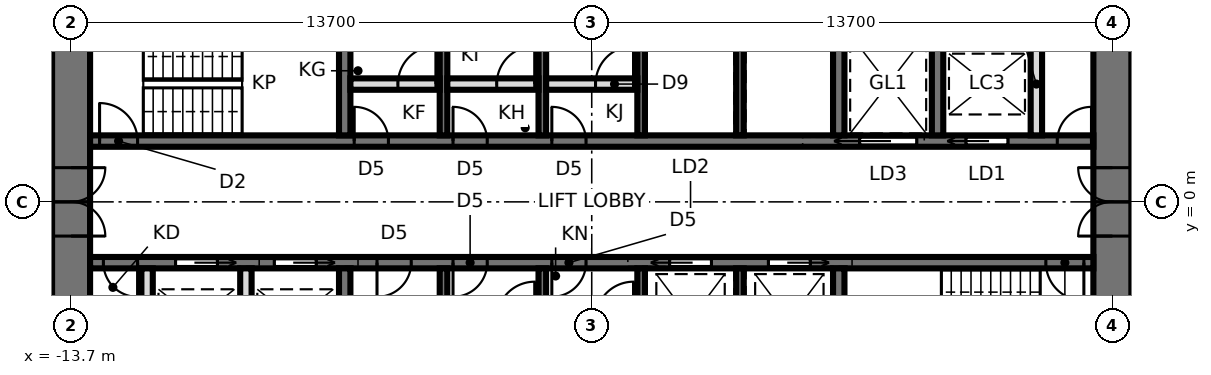
"""IFC4 building model, lengths in metres.
Left out: names, types, materials, properties, quantities, classifications, styles, units other than length and angle.
Written with IfcOpenShell. Run it as: python <this file> out.ifc"""

import sys

from ifc_helpers import new_model, si_unit, direction, frame, frame_2d, origin, place, context, subcontext, project, spatial, rectangle, extrude, element, fill, save


model = new_model("IFC4")
c1 = context("Model", 3, precision=1e-05, world=origin(), true_north=direction((0.0, 1.0)))
c2 = subcontext(c1, "Body", "Model", "MODEL_VIEW")
j1 = project(units=[si_unit("LENGTHUNIT", "METRE"), si_unit("PLANEANGLEUNIT", "RADIAN")], contexts=[c1])
p1 = place(None, origin())
s1 = spatial("IfcSite", under=j1, at=p1, CompositionType="ELEMENT")
p2 = place(p1, origin())
s2 = spatial("IfcBuilding", under=s1, at=p2, CompositionType="ELEMENT")
p3 = place(p2, frame((0.0, 0.0, 187.7)))
s3 = spatial("IfcBuildingStorey", under=s2, at=p3, CompositionType="ELEMENT", Elevation=187.7)
p4 = place(p3, frame((13.7, -9.5, 0.0), z_axis=(0.0, 0.0, 1.0), x_axis=(0.0, 1.0, 0.0)))
e1 = element("IfcWall", 1, at=p4, inside=s3, PredefinedType="SHEAR", context=c2, shape_type="SweptSolid", body=[
    extrude(rectangle(XDim=19.0, YDim=1.0, at=frame_2d((9.5, 0.0))), origin(), (0.0, 0.0, 1.0), 3.9),
])
p5 = place(p4, frame((8.6, 0.0, 0.0)))
e2 = element("IfcOpeningElement", 2, at=p5, cuts=e1, PredefinedType="OPENING", context=c2, shape_type="SweptSolid", body=[
    extrude(rectangle(XDim=1.8, YDim=2.4, at=frame_2d((0.9, 1.2))), frame((0.0, 0.51, 0.0), z_axis=(0.0, -1.0, 0.0), x_axis=(1.0, 0.0, 0.0)), (0.0, 0.0, 1.0), 1.02),
])
p6 = place(p3, frame((-13.7, 9.5, 0.0), z_axis=(0.0, 0.0, 1.0), x_axis=(0.0, -1.0, 0.0)))
e3 = element("IfcWall", 3, at=p6, inside=s3, PredefinedType="SHEAR", context=c2, shape_type="SweptSolid", body=[
    extrude(rectangle(XDim=19.0, YDim=1.0, at=frame_2d((9.5, 0.0))), origin(), (0.0, 0.0, 1.0), 3.9),
])
p7 = place(p6, frame((8.6, 0.0, 0.0)))
e4 = element("IfcOpeningElement", 4, at=p7, cuts=e3, PredefinedType="OPENING", context=c2, shape_type="SweptSolid", body=[
    extrude(rectangle(XDim=1.8, YDim=2.4, at=frame_2d((0.9, 1.2))), frame((0.0, 0.51, 0.0), z_axis=(0.0, -1.0, 0.0), x_axis=(1.0, 0.0, 0.0)), (0.0, 0.0, 1.0), 1.02),
])
p8 = place(p3, frame((-13.2, 1.6, 0.0), z_axis=(0.0, 0.0, 1.0), x_axis=(1.0, 0.0, 0.0)))
e5 = element("IfcWall", 5, at=p8, inside=s3, PredefinedType="SHEAR", context=c2, shape_type="SweptSolid", body=[
    extrude(rectangle(XDim=26.4, YDim=0.3, at=frame_2d((13.2, 0.0))), origin(), (0.0, 0.0, 1.0), 3.9),
])
p9 = place(p8, frame((0.25, 0.0, 0.0)))
e6 = element("IfcOpeningElement", 6, at=p9, cuts=e5, PredefinedType="OPENING", context=c2, shape_type="SweptSolid", body=[
    extrude(rectangle(XDim=1.0, YDim=2.1, at=frame_2d((0.5, 1.05))), frame((0.0, 0.16, 0.0), z_axis=(0.0, -1.0, 0.0), x_axis=(1.0, 0.0, 0.0)), (0.0, 0.0, 1.0), 0.32),
])
p10 = place(p8, frame((23.05, 0.0, 0.0)))
e7 = element("IfcOpeningElement", 7, at=p10, cuts=e5, PredefinedType="OPENING", context=c2, shape_type="SweptSolid", body=[
    extrude(rectangle(XDim=1.1, YDim=2.3, at=frame_2d((0.55, 1.15))), frame((0.0, 0.16, 0.0), z_axis=(0.0, -1.0, 0.0), x_axis=(1.0, 0.0, 0.0)), (0.0, 0.0, 1.0), 0.32),
])
p11 = place(p8, frame((20.25, 0.0, 0.0)))
e8 = element("IfcOpeningElement", 8, at=p11, cuts=e5, PredefinedType="OPENING", context=c2, shape_type="SweptSolid", body=[
    extrude(rectangle(XDim=1.5, YDim=2.4, at=frame_2d((0.75, 1.2))), frame((0.0, 0.16, 0.0), z_axis=(0.0, -1.0, 0.0), x_axis=(1.0, 0.0, 0.0)), (0.0, 0.0, 1.0), 0.32),
])
p12 = place(p8, frame((6.95, 0.0, 0.0)))
e9 = element("IfcOpeningElement", 9, at=p12, cuts=e5, PredefinedType="OPENING", context=c2, shape_type="SweptSolid", body=[
    extrude(rectangle(XDim=0.9, YDim=2.1, at=frame_2d((0.45, 1.05))), frame((0.0, 0.16, 0.0), z_axis=(0.0, -1.0, 0.0), x_axis=(1.0, 0.0, 0.0)), (0.0, 0.0, 1.0), 0.32),
])
p13 = place(p8, frame((9.55, 0.0, 0.0)))
e10 = element("IfcOpeningElement", 10, at=p13, cuts=e5, PredefinedType="OPENING", context=c2, shape_type="SweptSolid", body=[
    extrude(rectangle(XDim=0.9, YDim=2.1, at=frame_2d((0.45, 1.05))), frame((0.0, 0.16, 0.0), z_axis=(0.0, -1.0, 0.0), x_axis=(1.0, 0.0, 0.0)), (0.0, 0.0, 1.0), 0.32),
])
p14 = place(p8, frame((12.15, 0.0, 0.0)))
e11 = element("IfcOpeningElement", 11, at=p14, cuts=e5, PredefinedType="OPENING", context=c2, shape_type="SweptSolid", body=[
    extrude(rectangle(XDim=0.9, YDim=2.1, at=frame_2d((0.45, 1.05))), frame((0.0, 0.16, 0.0), z_axis=(0.0, -1.0, 0.0), x_axis=(1.0, 0.0, 0.0)), (0.0, 0.0, 1.0), 0.32),
])
p15 = place(p8, frame((25.45, 0.0, 0.0)))
e12 = element("IfcOpeningElement", 12, at=p15, cuts=e5, PredefinedType="OPENING", context=c2, shape_type="SweptSolid", body=[
    extrude(rectangle(XDim=0.9, YDim=2.1, at=frame_2d((0.45, 1.05))), frame((0.0, 0.16, 0.0), z_axis=(0.0, -1.0, 0.0), x_axis=(1.0, 0.0, 0.0)), (0.0, 0.0, 1.0), 0.32),
])
p16 = place(p3, frame((-13.2, -1.6, 0.0), z_axis=(0.0, 0.0, 1.0), x_axis=(1.0, 0.0, 0.0)))
e13 = element("IfcWall", 13, at=p16, inside=s3, PredefinedType="SHEAR", context=c2, shape_type="SweptSolid", body=[
    extrude(rectangle(XDim=26.4, YDim=0.3, at=frame_2d((13.2, 0.0))), origin(), (0.0, 0.0, 1.0), 3.9),
])
p17 = place(p16, frame((25.15, 0.0, 0.0)))
e14 = element("IfcOpeningElement", 14, at=p17, cuts=e13, PredefinedType="OPENING", context=c2, shape_type="SweptSolid", body=[
    extrude(rectangle(XDim=1.0, YDim=2.1, at=frame_2d((0.5, 1.05))), frame((0.0, 0.16, 0.0), z_axis=(0.0, -1.0, 0.0), x_axis=(1.0, 0.0, 0.0)), (0.0, 0.0, 1.0), 0.32),
])
p18 = place(p16, frame((7.55, 0.0, 0.0)))
e15 = element("IfcOpeningElement", 15, at=p18, cuts=e13, PredefinedType="OPENING", context=c2, shape_type="SweptSolid", body=[
    extrude(rectangle(XDim=0.9, YDim=2.1, at=frame_2d((0.45, 1.05))), frame((0.0, 0.16, 0.0), z_axis=(0.0, -1.0, 0.0), x_axis=(1.0, 0.0, 0.0)), (0.0, 0.0, 1.0), 0.32),
])
p19 = place(p16, frame((9.55, 0.0, 0.0)))
e16 = element("IfcOpeningElement", 16, at=p19, cuts=e13, PredefinedType="OPENING", context=c2, shape_type="SweptSolid", body=[
    extrude(rectangle(XDim=0.9, YDim=2.1, at=frame_2d((0.45, 1.05))), frame((0.0, 0.16, 0.0), z_axis=(0.0, -1.0, 0.0), x_axis=(1.0, 0.0, 0.0)), (0.0, 0.0, 1.0), 0.32),
])
p20 = place(p16, frame((12.15, 0.0, 0.0)))
e17 = element("IfcOpeningElement", 17, at=p20, cuts=e13, PredefinedType="OPENING", context=c2, shape_type="SweptSolid", body=[
    extrude(rectangle(XDim=0.9, YDim=2.1, at=frame_2d((0.45, 1.05))), frame((0.0, 0.16, 0.0), z_axis=(0.0, -1.0, 0.0), x_axis=(1.0, 0.0, 0.0)), (0.0, 0.0, 1.0), 0.32),
])
p21 = place(p16, frame((15.25, 0.0, 0.0)))
e18 = element("IfcOpeningElement", 18, at=p21, cuts=e13, PredefinedType="OPENING", context=c2, shape_type="SweptSolid", body=[
    extrude(rectangle(XDim=1.1, YDim=2.3, at=frame_2d((0.55, 1.15))), frame((0.0, 0.16, 0.0), z_axis=(0.0, -1.0, 0.0), x_axis=(1.0, 0.0, 0.0)), (0.0, 0.0, 1.0), 0.32),
])
p22 = place(p16, frame((17.85, 0.0, 0.0)))
e19 = element("IfcOpeningElement", 19, at=p22, cuts=e13, PredefinedType="OPENING", context=c2, shape_type="SweptSolid", body=[
    extrude(rectangle(XDim=1.1, YDim=2.3, at=frame_2d((0.55, 1.15))), frame((0.0, 0.16, 0.0), z_axis=(0.0, -1.0, 0.0), x_axis=(1.0, 0.0, 0.0)), (0.0, 0.0, 1.0), 0.32),
])
p23 = place(p16, frame((4.85, 0.0, 0.0)))
e20 = element("IfcOpeningElement", 20, at=p23, cuts=e13, PredefinedType="OPENING", context=c2, shape_type="SweptSolid", body=[
    extrude(rectangle(XDim=1.1, YDim=2.3, at=frame_2d((0.55, 1.15))), frame((0.0, 0.16, 0.0), z_axis=(0.0, -1.0, 0.0), x_axis=(1.0, 0.0, 0.0)), (0.0, 0.0, 1.0), 0.32),
])
p24 = place(p16, frame((2.25, 0.0, 0.0)))
e21 = element("IfcOpeningElement", 21, at=p24, cuts=e13, PredefinedType="OPENING", context=c2, shape_type="SweptSolid", body=[
    extrude(rectangle(XDim=1.1, YDim=2.3, at=frame_2d((0.55, 1.15))), frame((0.0, 0.16, 0.0), z_axis=(0.0, -1.0, 0.0), x_axis=(1.0, 0.0, 0.0)), (0.0, 0.0, 1.0), 0.32),
])
p25 = place(p16, frame((0.35, 0.0, 0.0)))
e22 = element("IfcOpeningElement", 22, at=p25, cuts=e13, PredefinedType="OPENING", context=c2, shape_type="SweptSolid", body=[
    extrude(rectangle(XDim=0.9, YDim=2.1, at=frame_2d((0.45, 1.05))), frame((0.0, 0.16, 0.0), z_axis=(0.0, -1.0, 0.0), x_axis=(1.0, 0.0, 0.0)), (0.0, 0.0, 1.0), 0.32),
])
for number, where, z_axis, x_axis in (
    (23, (-6.5, 1.75, 0.0), (0.0, 0.0, 1.0), (0.0, 1.0, 0.0)),
    (24, (6.5, 1.75, 0.0), (0.0, 0.0, 1.0), (0.0, 1.0, 0.0)),
):
    element("IfcWall", number, at=place(p3, frame(where, z_axis=z_axis, x_axis=x_axis)), inside=s3, PredefinedType="SHEAR", context=c2, shape_type="SweptSolid", body=[
        extrude(rectangle(XDim=2.7, YDim=0.3, at=frame_2d((1.35, 0.0))), origin(), (0.0, 0.0, 1.0), 3.9),
    ])
for number, where, z_axis, x_axis in (
    (25, (-3.9, 1.75, 0.0), (0.0, 0.0, 1.0), (0.0, 1.0, 0.0)),
    (26, (-1.3, 1.75, 0.0), (0.0, 0.0, 1.0), (0.0, 1.0, 0.0)),
    (27, (1.3, 1.75, 0.0), (0.0, 0.0, 1.0), (0.0, 1.0, 0.0)),
    (28, (3.9, 1.75, 0.0), (0.0, 0.0, 1.0), (0.0, 1.0, 0.0)),
):
    element("IfcWall", number, at=place(p3, frame(where, z_axis=z_axis, x_axis=x_axis)), inside=s3, PredefinedType="SHEAR", context=c2, shape_type="SweptSolid", body=[
        extrude(rectangle(XDim=2.7, YDim=0.2, at=frame_2d((1.35, 0.0))), origin(), (0.0, 0.0, 1.0), 3.9),
    ])
for number, where, z_axis, x_axis in (
    (29, (-6.5, -1.75, 0.0), (0.0, 0.0, 1.0), (0.0, -1.0, 0.0)),
    (30, (6.5, -1.75, 0.0), (0.0, 0.0, 1.0), (0.0, -1.0, 0.0)),
):
    element("IfcWall", number, at=place(p3, frame(where, z_axis=z_axis, x_axis=x_axis)), inside=s3, PredefinedType="SHEAR", context=c2, shape_type="SweptSolid", body=[
        extrude(rectangle(XDim=2.7, YDim=0.3, at=frame_2d((1.35, 0.0))), origin(), (0.0, 0.0, 1.0), 3.9),
    ])
for number, where, z_axis, x_axis in (
    (31, (-3.9, -1.75, 0.0), (0.0, 0.0, 1.0), (0.0, -1.0, 0.0)),
    (32, (-1.3, -1.75, 0.0), (0.0, 0.0, 1.0), (0.0, -1.0, 0.0)),
    (33, (1.3, -1.75, 0.0), (0.0, 0.0, 1.0), (0.0, -1.0, 0.0)),
    (34, (3.9, -1.75, 0.0), (0.0, 0.0, 1.0), (0.0, -1.0, 0.0)),
):
    element("IfcWall", number, at=place(p3, frame(where, z_axis=z_axis, x_axis=x_axis)), inside=s3, PredefinedType="SHEAR", context=c2, shape_type="SweptSolid", body=[
        extrude(rectangle(XDim=2.7, YDim=0.2, at=frame_2d((1.35, 0.0))), origin(), (0.0, 0.0, 1.0), 3.9),
    ])
p26 = place(p3, frame((9.1, 1.75, 0.0), z_axis=(0.0, 0.0, 1.0), x_axis=(0.0, 1.0, 0.0)))
e35 = element("IfcWall", 35, at=p26, inside=s3, PredefinedType="SHEAR", context=c2, shape_type="SweptSolid", body=[
    extrude(rectangle(XDim=2.7, YDim=0.3, at=frame_2d((1.35, 0.0))), origin(), (0.0, 0.0, 1.0), 3.9),
])
p27 = place(p3, frame((-6.35, 3.1, 0.0), z_axis=(0.0, 0.0, 1.0), x_axis=(1.0, 0.0, 0.0)))
e36 = element("IfcWall", 36, at=p27, inside=s3, PredefinedType="PARTITIONING", context=c2, shape_type="SweptSolid", body=[
    extrude(rectangle(XDim=2.35, YDim=0.3, at=frame_2d((1.175, 0.0))), origin(), (0.0, 0.0, 1.0), 3.74),
])
p28 = place(p27, frame((1.25, 0.0, 0.0)))
e37 = element("IfcOpeningElement", 37, at=p28, cuts=e36, PredefinedType="OPENING", context=c2, shape_type="SweptSolid", body=[
    extrude(rectangle(XDim=1.0, YDim=2.4, at=frame_2d((0.5, 1.2))), frame((0.0, 0.16, 0.0), z_axis=(0.0, -1.0, 0.0), x_axis=(1.0, 0.0, 0.0)), (0.0, 0.0, 1.0), 0.32),
])
p29 = place(p3, frame((-3.8, 3.1, 0.0), z_axis=(0.0, 0.0, 1.0), x_axis=(1.0, 0.0, 0.0)))
e38 = element("IfcWall", 38, at=p29, inside=s3, PredefinedType="PARTITIONING", context=c2, shape_type="SweptSolid", body=[
    extrude(rectangle(XDim=2.4, YDim=0.3, at=frame_2d((1.2, 0.0))), origin(), (0.0, 0.0, 1.0), 3.74),
])
p30 = place(p29, frame((1.3, 0.0, 0.0)))
e39 = element("IfcOpeningElement", 39, at=p30, cuts=e38, PredefinedType="OPENING", context=c2, shape_type="SweptSolid", body=[
    extrude(rectangle(XDim=1.0, YDim=2.4, at=frame_2d((0.5, 1.2))), frame((0.0, 0.16, 0.0), z_axis=(0.0, -1.0, 0.0), x_axis=(1.0, 0.0, 0.0)), (0.0, 0.0, 1.0), 0.32),
])
p31 = place(p3, frame((-1.2, 3.1, 0.0), z_axis=(0.0, 0.0, 1.0), x_axis=(1.0, 0.0, 0.0)))
e40 = element("IfcWall", 40, at=p31, inside=s3, PredefinedType="PARTITIONING", context=c2, shape_type="SweptSolid", body=[
    extrude(rectangle(XDim=2.4, YDim=0.3, at=frame_2d((1.2, 0.0))), origin(), (0.0, 0.0, 1.0), 3.74),
])
p32 = place(p31, frame((1.3, 0.0, 0.0)))
e41 = element("IfcOpeningElement", 41, at=p32, cuts=e40, PredefinedType="OPENING", context=c2, shape_type="SweptSolid", body=[
    extrude(rectangle(XDim=1.0, YDim=2.4, at=frame_2d((0.5, 1.2))), frame((0.0, 0.16, 0.0), z_axis=(0.0, -1.0, 0.0), x_axis=(1.0, 0.0, 0.0)), (0.0, 0.0, 1.0), 0.32),
])
for number, where, z_axis, x_axis in (
    (42, (-9.1, -1.75, 0.0), (0.0, 0.0, 1.0), (0.0, -1.0, 0.0)),
    (43, (-11.7, -1.75, 0.0), (0.0, 0.0, 1.0), (0.0, -1.0, 0.0)),
    (44, (11.7, 1.75, 0.0), (0.0, 0.0, 1.0), (0.0, 1.0, 0.0)),
):
    element("IfcWall", number, at=place(p3, frame(where, z_axis=z_axis, x_axis=x_axis)), inside=s3, PredefinedType="SOLIDWALL", context=c2, shape_type="SweptSolid", body=[
        extrude(rectangle(XDim=2.7, YDim=0.3, at=frame_2d((1.35, 0.0))), origin(), (0.0, 0.0, 1.0), 3.74),
    ])
p33 = place(p7, origin())
e45 = element("IfcDoor", 45, at=p33, inside=s3, OperationType="DOUBLE_DOOR_SINGLE_SWING", PredefinedType="DOOR", context=c2, shape_type="SweptSolid", body=[
    extrude(rectangle(XDim=1.72, YDim=2.36, at=frame_2d((0.9, 1.18))), frame((0.0, 0.025, 0.0), z_axis=(0.0, -1.0, 0.0), x_axis=(1.0, 0.0, 0.0)), (0.0, 0.0, 1.0), 0.05),
    extrude(rectangle(XDim=0.04, YDim=2.4, at=frame_2d((0.02, 1.2))), frame((0.0, 0.25, 0.0), z_axis=(0.0, -1.0, 0.0), x_axis=(1.0, 0.0, 0.0)), (0.0, 0.0, 1.0), 0.5),
    extrude(rectangle(XDim=0.04, YDim=2.4, at=frame_2d((1.78, 1.2))), frame((0.0, 0.25, 0.0), z_axis=(0.0, -1.0, 0.0), x_axis=(1.0, 0.0, 0.0)), (0.0, 0.0, 1.0), 0.5),
    extrude(rectangle(XDim=1.72, YDim=0.04, at=frame_2d((0.9, 2.38))), frame((0.0, 0.25, 0.0), z_axis=(0.0, -1.0, 0.0), x_axis=(1.0, 0.0, 0.0)), (0.0, 0.0, 1.0), 0.5),
])
fill(e4, e45)
p34 = place(p5, origin())
e46 = element("IfcDoor", 46, at=p34, inside=s3, OperationType="DOUBLE_DOOR_SINGLE_SWING", PredefinedType="DOOR", context=c2, shape_type="SweptSolid", body=[
    extrude(rectangle(XDim=1.72, YDim=2.36, at=frame_2d((0.9, 1.18))), frame((0.0, 0.025, 0.0), z_axis=(0.0, -1.0, 0.0), x_axis=(1.0, 0.0, 0.0)), (0.0, 0.0, 1.0), 0.05),
    extrude(rectangle(XDim=0.04, YDim=2.4, at=frame_2d((0.02, 1.2))), frame((0.0, 0.25, 0.0), z_axis=(0.0, -1.0, 0.0), x_axis=(1.0, 0.0, 0.0)), (0.0, 0.0, 1.0), 0.5),
    extrude(rectangle(XDim=0.04, YDim=2.4, at=frame_2d((1.78, 1.2))), frame((0.0, 0.25, 0.0), z_axis=(0.0, -1.0, 0.0), x_axis=(1.0, 0.0, 0.0)), (0.0, 0.0, 1.0), 0.5),
    extrude(rectangle(XDim=1.72, YDim=0.04, at=frame_2d((0.9, 2.38))), frame((0.0, 0.25, 0.0), z_axis=(0.0, -1.0, 0.0), x_axis=(1.0, 0.0, 0.0)), (0.0, 0.0, 1.0), 0.5),
])
fill(e2, e46)
p35 = place(p9, origin())
e47 = element("IfcDoor", 47, at=p35, inside=s3, OperationType="SINGLE_SWING_LEFT", PredefinedType="DOOR", context=c2, shape_type="SweptSolid", body=[
    extrude(rectangle(XDim=1.0, YDim=2.1, at=frame_2d((0.5, 1.05))), frame((0.0, 0.025, 0.0), z_axis=(0.0, -1.0, 0.0), x_axis=(1.0, 0.0, 0.0)), (0.0, 0.0, 1.0), 0.05),
])
fill(e6, e47)
p36 = place(p17, frame((1.0, 0.0, 0.0), z_axis=(0.0, 0.0, 1.0), x_axis=(-1.0, 0.0, 0.0)))
e48 = element("IfcDoor", 48, at=p36, inside=s3, OperationType="SINGLE_SWING_LEFT", PredefinedType="DOOR", context=c2, shape_type="SweptSolid", body=[
    extrude(rectangle(XDim=1.0, YDim=2.1, at=frame_2d((0.5, 1.05))), frame((0.0, 0.025, 0.0), z_axis=(0.0, -1.0, 0.0), x_axis=(1.0, 0.0, 0.0)), (0.0, 0.0, 1.0), 0.05),
])
fill(e14, e48)
p37 = place(p10, origin())
e49 = element("IfcDoor", 49, at=p37, inside=s3, OperationType="SLIDING_TO_LEFT", PredefinedType="DOOR", context=c2, shape_type="SweptSolid", body=[
    extrude(rectangle(XDim=1.1, YDim=2.3, at=frame_2d((0.55, 1.15))), frame((0.0, 0.025, 0.0), z_axis=(0.0, -1.0, 0.0), x_axis=(1.0, 0.0, 0.0)), (0.0, 0.0, 1.0), 0.05),
])
fill(e7, e49)
p38 = place(p11, origin())
e50 = element("IfcDoor", 50, at=p38, inside=s3, OperationType="SLIDING_TO_LEFT", PredefinedType="DOOR", context=c2, shape_type="SweptSolid", body=[
    extrude(rectangle(XDim=1.5, YDim=2.4, at=frame_2d((0.75, 1.2))), frame((0.0, 0.025, 0.0), z_axis=(0.0, -1.0, 0.0), x_axis=(1.0, 0.0, 0.0)), (0.0, 0.0, 1.0), 0.05),
])
fill(e8, e50)
p39 = place(p28, origin())
e51 = element("IfcDoor", 51, at=p39, inside=s3, OperationType="SINGLE_SWING_RIGHT", PredefinedType="DOOR", context=c2, shape_type="SweptSolid", body=[
    extrude(rectangle(XDim=1.0, YDim=2.4, at=frame_2d((0.5, 1.2))), frame((0.0, 0.025, 0.0), z_axis=(0.0, -1.0, 0.0), x_axis=(1.0, 0.0, 0.0)), (0.0, 0.0, 1.0), 0.05),
])
fill(e37, e51)
p40 = place(p12, origin())
e52 = element("IfcDoor", 52, at=p40, inside=s3, OperationType="SINGLE_SWING_LEFT", PredefinedType="DOOR", context=c2, shape_type="SweptSolid", body=[
    extrude(rectangle(XDim=0.9, YDim=2.1, at=frame_2d((0.45, 1.05))), frame((0.0, 0.025, 0.0), z_axis=(0.0, -1.0, 0.0), x_axis=(1.0, 0.0, 0.0)), (0.0, 0.0, 1.0), 0.05),
])
fill(e9, e52)
p41 = place(p30, origin())
e53 = element("IfcDoor", 53, at=p41, inside=s3, OperationType="SINGLE_SWING_RIGHT", PredefinedType="DOOR", context=c2, shape_type="SweptSolid", body=[
    extrude(rectangle(XDim=1.0, YDim=2.4, at=frame_2d((0.5, 1.2))), frame((0.0, 0.025, 0.0), z_axis=(0.0, -1.0, 0.0), x_axis=(1.0, 0.0, 0.0)), (0.0, 0.0, 1.0), 0.05),
])
fill(e39, e53)
p42 = place(p13, origin())
e54 = element("IfcDoor", 54, at=p42, inside=s3, OperationType="SINGLE_SWING_LEFT", PredefinedType="DOOR", context=c2, shape_type="SweptSolid", body=[
    extrude(rectangle(XDim=0.9, YDim=2.1, at=frame_2d((0.45, 1.05))), frame((0.0, 0.025, 0.0), z_axis=(0.0, -1.0, 0.0), x_axis=(1.0, 0.0, 0.0)), (0.0, 0.0, 1.0), 0.05),
])
fill(e10, e54)
p43 = place(p32, origin())
e55 = element("IfcDoor", 55, at=p43, inside=s3, OperationType="SINGLE_SWING_RIGHT", PredefinedType="DOOR", context=c2, shape_type="SweptSolid", body=[
    extrude(rectangle(XDim=1.0, YDim=2.4, at=frame_2d((0.5, 1.2))), frame((0.0, 0.025, 0.0), z_axis=(0.0, -1.0, 0.0), x_axis=(1.0, 0.0, 0.0)), (0.0, 0.0, 1.0), 0.05),
])
fill(e41, e55)
p44 = place(p14, origin())
e56 = element("IfcDoor", 56, at=p44, inside=s3, OperationType="SINGLE_SWING_LEFT", PredefinedType="DOOR", context=c2, shape_type="SweptSolid", body=[
    extrude(rectangle(XDim=0.9, YDim=2.1, at=frame_2d((0.45, 1.05))), frame((0.0, 0.025, 0.0), z_axis=(0.0, -1.0, 0.0), x_axis=(1.0, 0.0, 0.0)), (0.0, 0.0, 1.0), 0.05),
])
fill(e11, e56)
p45 = place(p18, frame((0.9, 0.0, 0.0), z_axis=(0.0, 0.0, 1.0), x_axis=(-1.0, 0.0, 0.0)))
e57 = element("IfcDoor", 57, at=p45, inside=s3, OperationType="SINGLE_SWING_RIGHT", PredefinedType="DOOR", context=c2, shape_type="SweptSolid", body=[
    extrude(rectangle(XDim=0.9, YDim=2.1, at=frame_2d((0.45, 1.05))), frame((0.0, 0.025, 0.0), z_axis=(0.0, -1.0, 0.0), x_axis=(1.0, 0.0, 0.0)), (0.0, 0.0, 1.0), 0.05),
])
fill(e15, e57)
p46 = place(p19, frame((0.9, 0.0, 0.0), z_axis=(0.0, 0.0, 1.0), x_axis=(-1.0, 0.0, 0.0)))
e58 = element("IfcDoor", 58, at=p46, inside=s3, OperationType="SINGLE_SWING_RIGHT", PredefinedType="DOOR", context=c2, shape_type="SweptSolid", body=[
    extrude(rectangle(XDim=0.9, YDim=2.1, at=frame_2d((0.45, 1.05))), frame((0.0, 0.025, 0.0), z_axis=(0.0, -1.0, 0.0), x_axis=(1.0, 0.0, 0.0)), (0.0, 0.0, 1.0), 0.05),
])
fill(e16, e58)
p47 = place(p20, frame((0.9, 0.0, 0.0), z_axis=(0.0, 0.0, 1.0), x_axis=(-1.0, 0.0, 0.0)))
e59 = element("IfcDoor", 59, at=p47, inside=s3, OperationType="SINGLE_SWING_RIGHT", PredefinedType="DOOR", context=c2, shape_type="SweptSolid", body=[
    extrude(rectangle(XDim=0.9, YDim=2.1, at=frame_2d((0.45, 1.05))), frame((0.0, 0.025, 0.0), z_axis=(0.0, -1.0, 0.0), x_axis=(1.0, 0.0, 0.0)), (0.0, 0.0, 1.0), 0.05),
])
fill(e17, e59)
p48 = place(p21, frame((1.1, 0.0, 0.0), z_axis=(0.0, 0.0, 1.0), x_axis=(-1.0, 0.0, 0.0)))
e60 = element("IfcDoor", 60, at=p48, inside=s3, OperationType="SLIDING_TO_RIGHT", PredefinedType="DOOR", context=c2, shape_type="SweptSolid", body=[
    extrude(rectangle(XDim=1.1, YDim=2.3, at=frame_2d((0.55, 1.15))), frame((0.0, 0.025, 0.0), z_axis=(0.0, -1.0, 0.0), x_axis=(1.0, 0.0, 0.0)), (0.0, 0.0, 1.0), 0.05),
])
fill(e18, e60)
p49 = place(p22, frame((1.1, 0.0, 0.0), z_axis=(0.0, 0.0, 1.0), x_axis=(-1.0, 0.0, 0.0)))
e61 = element("IfcDoor", 61, at=p49, inside=s3, OperationType="SLIDING_TO_LEFT", PredefinedType="DOOR", context=c2, shape_type="SweptSolid", body=[
    extrude(rectangle(XDim=1.1, YDim=2.3, at=frame_2d((0.55, 1.15))), frame((0.0, 0.025, 0.0), z_axis=(0.0, -1.0, 0.0), x_axis=(1.0, 0.0, 0.0)), (0.0, 0.0, 1.0), 0.05),
])
fill(e19, e61)
p50 = place(p23, frame((1.1, 0.0, 0.0), z_axis=(0.0, 0.0, 1.0), x_axis=(-1.0, 0.0, 0.0)))
e62 = element("IfcDoor", 62, at=p50, inside=s3, OperationType="SLIDING_TO_LEFT", PredefinedType="DOOR", context=c2, shape_type="SweptSolid", body=[
    extrude(rectangle(XDim=1.1, YDim=2.3, at=frame_2d((0.55, 1.15))), frame((0.0, 0.025, 0.0), z_axis=(0.0, -1.0, 0.0), x_axis=(1.0, 0.0, 0.0)), (0.0, 0.0, 1.0), 0.05),
])
fill(e20, e62)
p51 = place(p24, frame((1.1, 0.0, 0.0), z_axis=(0.0, 0.0, 1.0), x_axis=(-1.0, 0.0, 0.0)))
e63 = element("IfcDoor", 63, at=p51, inside=s3, OperationType="SLIDING_TO_LEFT", PredefinedType="DOOR", context=c2, shape_type="SweptSolid", body=[
    extrude(rectangle(XDim=1.1, YDim=2.3, at=frame_2d((0.55, 1.15))), frame((0.0, 0.025, 0.0), z_axis=(0.0, -1.0, 0.0), x_axis=(1.0, 0.0, 0.0)), (0.0, 0.0, 1.0), 0.05),
])
fill(e21, e63)
p52 = place(p15, origin())
e64 = element("IfcDoor", 64, at=p52, inside=s3, OperationType="SINGLE_SWING_RIGHT", PredefinedType="DOOR", context=c2, shape_type="SweptSolid", body=[
    extrude(rectangle(XDim=0.9, YDim=2.1, at=frame_2d((0.45, 1.05))), frame((0.0, 0.025, 0.0), z_axis=(0.0, -1.0, 0.0), x_axis=(1.0, 0.0, 0.0)), (0.0, 0.0, 1.0), 0.05),
])
fill(e12, e64)
p53 = place(p25, frame((0.9, 0.0, 0.0), z_axis=(0.0, 0.0, 1.0), x_axis=(-1.0, 0.0, 0.0)))
e65 = element("IfcDoor", 65, at=p53, inside=s3, OperationType="SINGLE_SWING_LEFT", PredefinedType="DOOR", context=c2, shape_type="SweptSolid", body=[
    extrude(rectangle(XDim=0.9, YDim=2.1, at=frame_2d((0.45, 1.05))), frame((0.0, 0.025, 0.0), z_axis=(0.0, -1.0, 0.0), x_axis=(1.0, 0.0, 0.0)), (0.0, 0.0, 1.0), 0.05),
])
fill(e22, e65)
save(model, sys.argv[1])
